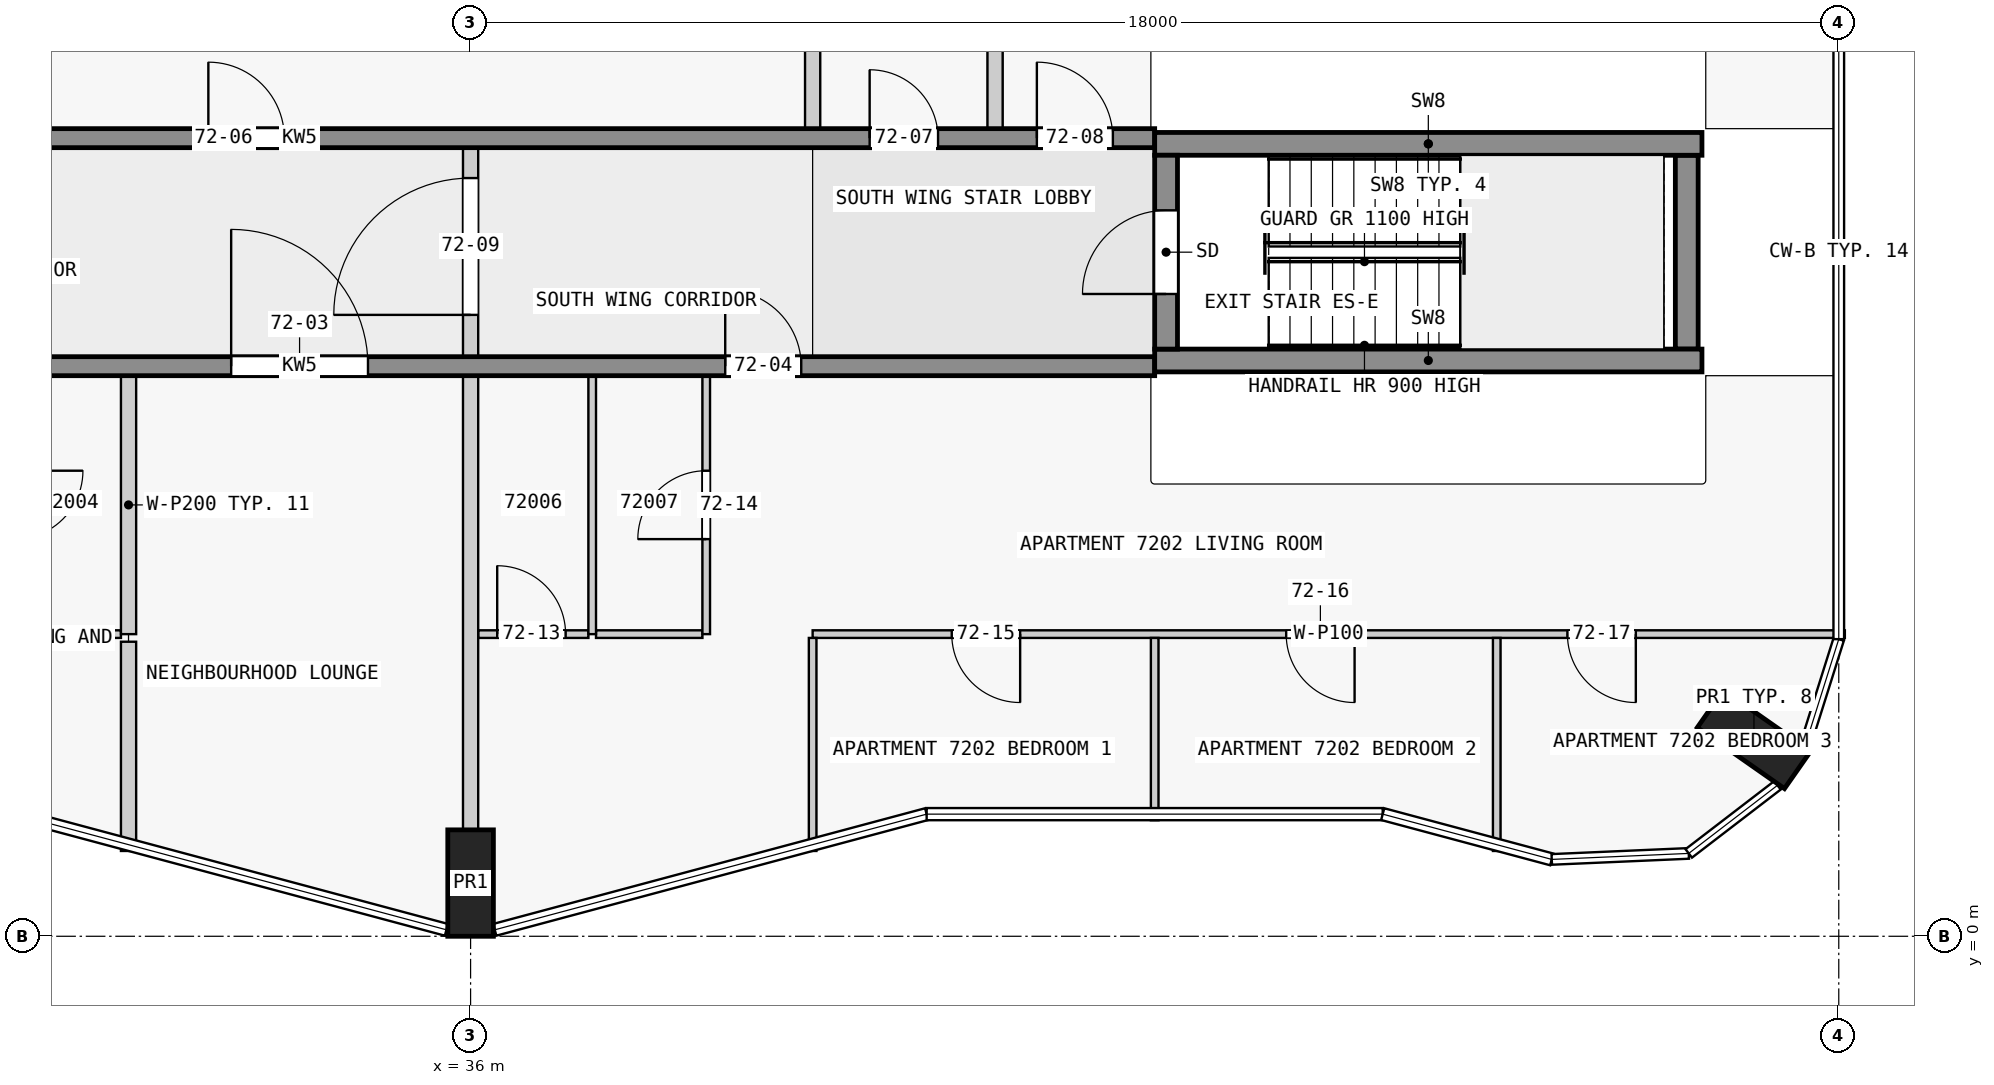
"""IFC4 building model, lengths in metres.
Left out: names, types, materials, properties, quantities, classifications, styles, units other than length and angle.
Written with IfcOpenShell. Run it as: python <this file> out.ifc"""

import sys

from ifc_helpers import new_model, si_unit, direction, frame, frame_2d, origin, origin_2d, place, context, subcontext, project, spatial, rectangle, extrude, element, fill, save


model = new_model("IFC4")
c1 = context("Model", 3, precision=1e-05, world=origin(), true_north=direction((0.0, 1.0)))
c2 = subcontext(c1, "Body", "Model", "MODEL_VIEW")
j1 = project(units=[si_unit("LENGTHUNIT", "METRE"), si_unit("PLANEANGLEUNIT", "RADIAN")], contexts=[c1])
p1 = place(None, origin())
s1 = spatial("IfcSite", under=j1, at=p1, CompositionType="ELEMENT")
p2 = place(p1, origin())
s2 = spatial("IfcBuilding", under=s1, at=p2, CompositionType="ELEMENT")
p3 = place(p2, frame((0.0, 0.0, 273.9)))
s3 = spatial("IfcBuildingStorey", under=s2, at=p3, CompositionType="ELEMENT", Elevation=273.9)
for number, where, z_axis, x_axis in (
    (1, (36.0, 0.7, 0.0), (0.0, 0.0, 1.0), (1.0, 0.0, 0.0)),
    (2, (52.884, 2.59, 0.0), (0.0, 0.0, 1.0), (0.574, 0.819, 0.0)),
):
    element("IfcColumn", number, at=place(p3, frame(where, z_axis=z_axis, x_axis=x_axis)), inside=s3, PredefinedType="COLUMN", context=c2, shape_type="SweptSolid", body=[
        extrude(rectangle(XDim=0.6, YDim=1.4, at=origin_2d()), origin(), (0.0, 0.0, 1.0), 3.5),
    ])
p4 = place(p3, frame((45.15, 7.725, 0.0), z_axis=(0.0, 0.0, 1.0), x_axis=(0.0, 1.0, 0.0)))
e3 = element("IfcWall", 3, at=p4, inside=s3, PredefinedType="SHEAR", context=c2, shape_type="SweptSolid", body=[
    extrude(rectangle(XDim=2.55, YDim=0.3, at=frame_2d((1.275, 0.0))), origin(), (0.0, 0.0, 1.0), 3.5),
])
p5 = place(p4, frame((0.725, 0.0, 0.0)))
e4 = element("IfcOpeningElement", 4, at=p5, cuts=e3, PredefinedType="OPENING", context=c2, shape_type="SweptSolid", body=[
    extrude(rectangle(XDim=1.1, YDim=2.1, at=frame_2d((0.55, 1.05))), frame((0.0, 0.16, 0.0), z_axis=(0.0, -1.0, 0.0), x_axis=(1.0, 0.0, 0.0)), (0.0, 0.0, 1.0), 0.32),
])
p6 = place(p3, frame((52.0, 7.725, 0.0), z_axis=(0.0, 0.0, 1.0), x_axis=(0.0, 1.0, 0.0)))
e5 = element("IfcWall", 5, at=p6, inside=s3, PredefinedType="SHEAR", context=c2, shape_type="SweptSolid", body=[
    extrude(rectangle(XDim=2.55, YDim=0.3, at=frame_2d((1.275, 0.0))), origin(), (0.0, 0.0, 1.0), 3.5),
])
for number, where, z_axis, x_axis in (
    (6, (45.0, 7.575, 0.0), (0.0, 0.0, 1.0), (1.0, 0.0, 0.0)),
    (7, (45.0, 10.425, 0.0), (0.0, 0.0, 1.0), (1.0, 0.0, 0.0)),
):
    element("IfcWall", number, at=place(p3, frame(where, z_axis=z_axis, x_axis=x_axis)), inside=s3, PredefinedType="SHEAR", context=c2, shape_type="SweptSolid", body=[
        extrude(rectangle(XDim=7.2, YDim=0.3, at=frame_2d((3.6, 0.0))), origin(), (0.0, 0.0, 1.0), 3.5),
    ])
p7 = place(p3, frame((22.5, 7.5, 0.0), z_axis=(0.0, 0.0, 1.0), x_axis=(1.0, 0.0, 0.0)))
e8 = element("IfcWall", 8, at=p7, inside=s3, PredefinedType="SHEAR", context=c2, shape_type="SweptSolid", body=[
    extrude(rectangle(XDim=22.5, YDim=0.25, at=frame_2d((11.25, 0.0))), origin(), (0.0, 0.0, 1.0), 3.25),
])
p8 = place(p7, frame((1.85, 0.0, 0.0)))
e9 = element("IfcOpeningElement", 9, at=p8, cuts=e8, PredefinedType="OPENING", context=c2, shape_type="SweptSolid", body=[
    extrude(rectangle(XDim=0.9, YDim=2.1, at=frame_2d((0.45, 1.05))), frame((0.0, 0.135, 0.0), z_axis=(0.0, -1.0, 0.0), x_axis=(1.0, 0.0, 0.0)), (0.0, 0.0, 1.0), 0.27),
])
p9 = place(p7, frame((6.25, 0.0, 0.0)))
e10 = element("IfcOpeningElement", 10, at=p9, cuts=e8, PredefinedType="OPENING", context=c2, shape_type="SweptSolid", body=[
    extrude(rectangle(XDim=1.0, YDim=2.1, at=frame_2d((0.5, 1.05))), frame((0.0, 0.135, 0.0), z_axis=(0.0, -1.0, 0.0), x_axis=(1.0, 0.0, 0.0)), (0.0, 0.0, 1.0), 0.27),
])
p10 = place(p7, frame((10.35, 0.0, 0.0)))
e11 = element("IfcOpeningElement", 11, at=p10, cuts=e8, PredefinedType="OPENING", context=c2, shape_type="SweptSolid", body=[
    extrude(rectangle(XDim=1.8, YDim=2.1, at=frame_2d((0.9, 1.05))), frame((0.0, 0.135, 0.0), z_axis=(0.0, -1.0, 0.0), x_axis=(1.0, 0.0, 0.0)), (0.0, 0.0, 1.0), 0.27),
])
p11 = place(p7, frame((16.85, 0.0, 0.0)))
e12 = element("IfcOpeningElement", 12, at=p11, cuts=e8, PredefinedType="OPENING", context=c2, shape_type="SweptSolid", body=[
    extrude(rectangle(XDim=1.0, YDim=2.1, at=frame_2d((0.5, 1.05))), frame((0.0, 0.135, 0.0), z_axis=(0.0, -1.0, 0.0), x_axis=(1.0, 0.0, 0.0)), (0.0, 0.0, 1.0), 0.27),
])
p12 = place(p3, frame((22.5, 10.5, 0.0), z_axis=(0.0, 0.0, 1.0), x_axis=(1.0, 0.0, 0.0)))
e13 = element("IfcWall", 13, at=p12, inside=s3, PredefinedType="SHEAR", context=c2, shape_type="SweptSolid", body=[
    extrude(rectangle(XDim=22.5, YDim=0.25, at=frame_2d((11.25, 0.0))), origin(), (0.0, 0.0, 1.0), 3.25),
])
p13 = place(p12, frame((1.85, 0.0, 0.0)))
e14 = element("IfcOpeningElement", 14, at=p13, cuts=e13, PredefinedType="OPENING", context=c2, shape_type="SweptSolid", body=[
    extrude(rectangle(XDim=0.9, YDim=2.1, at=frame_2d((0.45, 1.05))), frame((0.0, 0.135, 0.0), z_axis=(0.0, -1.0, 0.0), x_axis=(1.0, 0.0, 0.0)), (0.0, 0.0, 1.0), 0.27),
])
p14 = place(p12, frame((10.05, 0.0, 0.0)))
e15 = element("IfcOpeningElement", 15, at=p14, cuts=e13, PredefinedType="OPENING", context=c2, shape_type="SweptSolid", body=[
    extrude(rectangle(XDim=1.0, YDim=2.1, at=frame_2d((0.5, 1.05))), frame((0.0, 0.135, 0.0), z_axis=(0.0, -1.0, 0.0), x_axis=(1.0, 0.0, 0.0)), (0.0, 0.0, 1.0), 0.27),
])
p15 = place(p12, frame((18.75, 0.0, 0.0)))
e16 = element("IfcOpeningElement", 16, at=p15, cuts=e13, PredefinedType="OPENING", context=c2, shape_type="SweptSolid", body=[
    extrude(rectangle(XDim=0.9, YDim=2.1, at=frame_2d((0.45, 1.05))), frame((0.0, 0.135, 0.0), z_axis=(0.0, -1.0, 0.0), x_axis=(1.0, 0.0, 0.0)), (0.0, 0.0, 1.0), 0.27),
])
p16 = place(p12, frame((20.95, 0.0, 0.0)))
e17 = element("IfcOpeningElement", 17, at=p16, cuts=e13, PredefinedType="OPENING", context=c2, shape_type="SweptSolid", body=[
    extrude(rectangle(XDim=1.0, YDim=2.1, at=frame_2d((0.5, 1.05))), frame((0.0, 0.135, 0.0), z_axis=(0.0, -1.0, 0.0), x_axis=(1.0, 0.0, 0.0)), (0.0, 0.0, 1.0), 0.27),
])
p17 = place(p3, frame((54.08, 3.975, 0.0), z_axis=(0.0, 0.0, 1.0), x_axis=(-1.0, 0.0, 0.0)))
e18 = element("IfcWall", 18, at=p17, inside=s3, PredefinedType="PARTITIONING", context=c2, shape_type="SweptSolid", body=[
    extrude(rectangle(XDim=13.58, YDim=0.1, at=frame_2d((6.79, 0.0))), origin(), (0.0, 0.0, 1.0), 3.25),
])
p18 = place(p17, frame((10.85, 0.0, 0.0)))
e19 = element("IfcOpeningElement", 19, at=p18, cuts=e18, PredefinedType="OPENING", context=c2, shape_type="SweptSolid", body=[
    extrude(rectangle(XDim=0.9, YDim=2.1, at=frame_2d((0.45, 1.05))), frame((0.0, 0.06, 0.0), z_axis=(0.0, -1.0, 0.0), x_axis=(1.0, 0.0, 0.0)), (0.0, 0.0, 1.0), 0.12),
])
p19 = place(p17, frame((6.45, 0.0, 0.0)))
e20 = element("IfcOpeningElement", 20, at=p19, cuts=e18, PredefinedType="OPENING", context=c2, shape_type="SweptSolid", body=[
    extrude(rectangle(XDim=0.9, YDim=2.1, at=frame_2d((0.45, 1.05))), frame((0.0, 0.06, 0.0), z_axis=(0.0, -1.0, 0.0), x_axis=(1.0, 0.0, 0.0)), (0.0, 0.0, 1.0), 0.12),
])
p20 = place(p17, frame((2.75, 0.0, 0.0)))
e21 = element("IfcOpeningElement", 21, at=p20, cuts=e18, PredefinedType="OPENING", context=c2, shape_type="SweptSolid", body=[
    extrude(rectangle(XDim=0.9, YDim=2.1, at=frame_2d((0.45, 1.05))), frame((0.0, 0.06, 0.0), z_axis=(0.0, -1.0, 0.0), x_axis=(1.0, 0.0, 0.0)), (0.0, 0.0, 1.0), 0.12),
])
p21 = place(p3, frame((30.05, 3.975, 0.0), z_axis=(0.0, 0.0, 1.0), x_axis=(1.0, 0.0, 0.0)))
e22 = element("IfcWall", 22, at=p21, inside=s3, PredefinedType="PARTITIONING", context=c2, shape_type="SweptSolid", body=[
    extrude(rectangle(XDim=1.35, YDim=0.1, at=frame_2d((0.675, 0.0))), origin(), (0.0, 0.0, 1.0), 3.25),
])
p22 = place(p3, frame((36.1, 3.975, 0.0), z_axis=(0.0, 0.0, 1.0), x_axis=(1.0, 0.0, 0.0)))
e23 = element("IfcWall", 23, at=p22, inside=s3, PredefinedType="PARTITIONING", context=c2, shape_type="SweptSolid", body=[
    extrude(rectangle(XDim=1.45, YDim=0.1, at=frame_2d((0.725, 0.0))), origin(), (0.0, 0.0, 1.0), 3.25),
])
p23 = place(p22, frame((0.25, 0.0, 0.0)))
e24 = element("IfcOpeningElement", 24, at=p23, cuts=e23, PredefinedType="OPENING", context=c2, shape_type="SweptSolid", body=[
    extrude(rectangle(XDim=0.9, YDim=2.1, at=frame_2d((0.45, 1.05))), frame((0.0, 0.06, 0.0), z_axis=(0.0, -1.0, 0.0), x_axis=(1.0, 0.0, 0.0)), (0.0, 0.0, 1.0), 0.12),
])
p24 = place(p3, frame((37.65, 3.975, 0.0), z_axis=(0.0, 0.0, 1.0), x_axis=(1.0, 0.0, 0.0)))
e25 = element("IfcWall", 25, at=p24, inside=s3, PredefinedType="PARTITIONING", context=c2, shape_type="SweptSolid", body=[
    extrude(rectangle(XDim=1.4, YDim=0.1, at=frame_2d((0.7, 0.0))), origin(), (0.0, 0.0, 1.0), 3.25),
])
p25 = place(p3, frame((31.5, 3.875, 0.0), z_axis=(0.0, 0.0, 1.0), x_axis=(0.0, -1.0, 0.0)))
e26 = element("IfcWall", 26, at=p25, inside=s3, PredefinedType="PARTITIONING", context=c2, shape_type="SweptSolid", body=[
    extrude(rectangle(XDim=2.753, YDim=0.2, at=frame_2d((1.376, 0.0))), origin(), (0.0, 0.0, 1.0), 3.25),
])
p26 = place(p3, frame((31.5, 3.975, 0.0), z_axis=(0.0, 0.0, 1.0), x_axis=(0.0, 1.0, 0.0)))
e27 = element("IfcWall", 27, at=p26, inside=s3, PredefinedType="PARTITIONING", context=c2, shape_type="SweptSolid", body=[
    extrude(rectangle(XDim=3.4, YDim=0.2, at=frame_2d((1.7, 0.0))), origin(), (0.0, 0.0, 1.0), 3.25),
])
p27 = place(p3, frame((36.0, 1.4, 0.0), z_axis=(0.0, 0.0, 1.0), x_axis=(0.0, 1.0, 0.0)))
e28 = element("IfcWall", 28, at=p27, inside=s3, PredefinedType="PARTITIONING", context=c2, shape_type="SweptSolid", body=[
    extrude(rectangle(XDim=5.975, YDim=0.2, at=frame_2d((2.988, 0.0))), origin(), (0.0, 0.0, 1.0), 3.25),
])
p28 = place(p3, frame((37.6, 3.975, 0.0), z_axis=(0.0, 0.0, 1.0), x_axis=(0.0, 1.0, 0.0)))
e29 = element("IfcWall", 29, at=p28, inside=s3, PredefinedType="PARTITIONING", context=c2, shape_type="SweptSolid", body=[
    extrude(rectangle(XDim=3.4, YDim=0.1, at=frame_2d((1.7, 0.0))), origin(), (0.0, 0.0, 1.0), 3.25),
])
p29 = place(p3, frame((39.1, 3.975, 0.0), z_axis=(0.0, 0.0, 1.0), x_axis=(0.0, 1.0, 0.0)))
e30 = element("IfcWall", 30, at=p29, inside=s3, PredefinedType="PARTITIONING", context=c2, shape_type="SweptSolid", body=[
    extrude(rectangle(XDim=3.4, YDim=0.1, at=frame_2d((1.7, 0.0))), origin(), (0.0, 0.0, 1.0), 3.25),
])
p30 = place(p29, frame((1.25, 0.0, 0.0)))
e31 = element("IfcOpeningElement", 31, at=p30, cuts=e30, PredefinedType="OPENING", context=c2, shape_type="SweptSolid", body=[
    extrude(rectangle(XDim=0.9, YDim=2.1, at=frame_2d((0.45, 1.05))), frame((0.0, 0.06, 0.0), z_axis=(0.0, -1.0, 0.0), x_axis=(1.0, 0.0, 0.0)), (0.0, 0.0, 1.0), 0.12),
])
p31 = place(p3, frame((40.5, 3.925, 0.0), z_axis=(0.0, 0.0, 1.0), x_axis=(0.0, -1.0, 0.0)))
e32 = element("IfcWall", 32, at=p31, inside=s3, PredefinedType="PARTITIONING", context=c2, shape_type="SweptSolid", body=[
    extrude(rectangle(XDim=2.803, YDim=0.1, at=frame_2d((1.401, 0.0))), origin(), (0.0, 0.0, 1.0), 3.25),
])
for number, where, z_axis, x_axis in (
    (33, (40.5, 14.025, 0.0), (0.0, 0.0, 1.0), (0.0, -1.0, 0.0)),
    (34, (42.9, 10.625, 0.0), (0.0, 0.0, 1.0), (0.0, 1.0, 0.0)),
):
    element("IfcWall", number, at=place(p3, frame(where, z_axis=z_axis, x_axis=x_axis)), inside=s3, PredefinedType="PARTITIONING", context=c2, shape_type="SweptSolid", body=[
        extrude(rectangle(XDim=3.4, YDim=0.2, at=frame_2d((1.7, 0.0))), origin(), (0.0, 0.0, 1.0), 3.25),
    ])
p32 = place(p3, frame((45.0, 1.527, 0.0), z_axis=(0.0, 0.0, 1.0), x_axis=(0.0, 1.0, 0.0)))
e35 = element("IfcWall", 35, at=p32, inside=s3, PredefinedType="PARTITIONING", context=c2, shape_type="SweptSolid", body=[
    extrude(rectangle(XDim=2.398, YDim=0.1, at=frame_2d((1.199, 0.0))), origin(), (0.0, 0.0, 1.0), 3.25),
])
p33 = place(p3, frame((49.5, 1.122, 0.0), z_axis=(0.0, 0.0, 1.0), x_axis=(0.0, 1.0, 0.0)))
e36 = element("IfcWall", 36, at=p33, inside=s3, PredefinedType="PARTITIONING", context=c2, shape_type="SweptSolid", body=[
    extrude(rectangle(XDim=2.803, YDim=0.1, at=frame_2d((1.401, 0.0))), origin(), (0.0, 0.0, 1.0), 3.25),
])
p34 = place(p3, frame((36.0, 7.475, 0.0), z_axis=(0.0, 0.0, 1.0), x_axis=(0.0, 1.0, 0.0)))
e37 = element("IfcWall", 37, at=p34, inside=s3, PredefinedType="PARTITIONING", context=c2, shape_type="SweptSolid", body=[
    extrude(rectangle(XDim=3.15, YDim=0.2, at=frame_2d((1.575, 0.0))), origin(), (0.0, 0.0, 1.0), 3.25),
])
p35 = place(p34, frame((0.7, 0.0, 0.0)))
e38 = element("IfcOpeningElement", 38, at=p35, cuts=e37, PredefinedType="OPENING", context=c2, shape_type="SweptSolid", body=[
    extrude(rectangle(XDim=1.8, YDim=2.1, at=frame_2d((0.9, 1.05))), frame((0.0, 0.11, 0.0), z_axis=(0.0, -1.0, 0.0), x_axis=(1.0, 0.0, 0.0)), (0.0, 0.0, 1.0), 0.22),
])
p36 = place(p5, origin())
e39 = element("IfcDoor", 39, at=p36, inside=s3, OperationType="SINGLE_SWING_LEFT", PredefinedType="DOOR", context=c2, shape_type="SweptSolid", body=[
    extrude(rectangle(XDim=1.1, YDim=2.1, at=frame_2d((0.55, 1.05))), frame((0.0, 0.025, 0.0), z_axis=(0.0, -1.0, 0.0), x_axis=(1.0, 0.0, 0.0)), (0.0, 0.0, 1.0), 0.05),
])
fill(e4, e39)
p37 = place(p10, origin())
e40 = element("IfcDoor", 40, at=p37, inside=s3, OperationType="SINGLE_SWING_LEFT", PredefinedType="DOOR", context=c2, shape_type="SweptSolid", body=[
    extrude(rectangle(XDim=1.8, YDim=2.1, at=frame_2d((0.9, 1.05))), frame((0.0, 0.025, 0.0), z_axis=(0.0, -1.0, 0.0), x_axis=(1.0, 0.0, 0.0)), (0.0, 0.0, 1.0), 0.05),
])
fill(e11, e40)
p38 = place(p11, origin())
e41 = element("IfcDoor", 41, at=p38, inside=s3, OperationType="SINGLE_SWING_RIGHT", PredefinedType="DOOR", context=c2, shape_type="SweptSolid", body=[
    extrude(rectangle(XDim=1.0, YDim=2.1, at=frame_2d((0.5, 1.05))), frame((0.0, 0.025, 0.0), z_axis=(0.0, -1.0, 0.0), x_axis=(1.0, 0.0, 0.0)), (0.0, 0.0, 1.0), 0.05),
])
fill(e12, e41)
p39 = place(p14, origin())
e42 = element("IfcDoor", 42, at=p39, inside=s3, OperationType="SINGLE_SWING_LEFT", PredefinedType="DOOR", context=c2, shape_type="SweptSolid", body=[
    extrude(rectangle(XDim=1.0, YDim=2.1, at=frame_2d((0.5, 1.05))), frame((0.0, 0.025, 0.0), z_axis=(0.0, -1.0, 0.0), x_axis=(1.0, 0.0, 0.0)), (0.0, 0.0, 1.0), 0.05),
])
fill(e15, e42)
p40 = place(p15, origin())
e43 = element("IfcDoor", 43, at=p40, inside=s3, OperationType="SINGLE_SWING_RIGHT", PredefinedType="DOOR", context=c2, shape_type="SweptSolid", body=[
    extrude(rectangle(XDim=0.9, YDim=2.1, at=frame_2d((0.45, 1.05))), frame((0.0, 0.025, 0.0), z_axis=(0.0, -1.0, 0.0), x_axis=(1.0, 0.0, 0.0)), (0.0, 0.0, 1.0), 0.05),
])
fill(e16, e43)
p41 = place(p16, origin())
e44 = element("IfcDoor", 44, at=p41, inside=s3, OperationType="SINGLE_SWING_RIGHT", PredefinedType="DOOR", context=c2, shape_type="SweptSolid", body=[
    extrude(rectangle(XDim=1.0, YDim=2.1, at=frame_2d((0.5, 1.05))), frame((0.0, 0.025, 0.0), z_axis=(0.0, -1.0, 0.0), x_axis=(1.0, 0.0, 0.0)), (0.0, 0.0, 1.0), 0.05),
])
fill(e17, e44)
p42 = place(p35, origin())
e45 = element("IfcDoor", 45, at=p42, inside=s3, OperationType="SINGLE_SWING_RIGHT", PredefinedType="DOOR", context=c2, shape_type="SweptSolid", body=[
    extrude(rectangle(XDim=1.8, YDim=2.1, at=frame_2d((0.9, 1.05))), frame((0.0, 0.025, 0.0), z_axis=(0.0, -1.0, 0.0), x_axis=(1.0, 0.0, 0.0)), (0.0, 0.0, 1.0), 0.05),
])
fill(e38, e45)
p43 = place(p23, origin())
e46 = element("IfcDoor", 46, at=p43, inside=s3, OperationType="SINGLE_SWING_LEFT", PredefinedType="DOOR", context=c2, shape_type="SweptSolid", body=[
    extrude(rectangle(XDim=0.9, YDim=2.1, at=frame_2d((0.45, 1.05))), frame((0.0, 0.025, 0.0), z_axis=(0.0, -1.0, 0.0), x_axis=(1.0, 0.0, 0.0)), (0.0, 0.0, 1.0), 0.05),
])
fill(e24, e46)
p44 = place(p30, origin())
e47 = element("IfcDoor", 47, at=p44, inside=s3, OperationType="SINGLE_SWING_LEFT", PredefinedType="DOOR", context=c2, shape_type="SweptSolid", body=[
    extrude(rectangle(XDim=0.9, YDim=2.1, at=frame_2d((0.45, 1.05))), frame((0.0, 0.025, 0.0), z_axis=(0.0, -1.0, 0.0), x_axis=(1.0, 0.0, 0.0)), (0.0, 0.0, 1.0), 0.05),
])
fill(e31, e47)
p45 = place(p18, origin())
e48 = element("IfcDoor", 48, at=p45, inside=s3, OperationType="SINGLE_SWING_RIGHT", PredefinedType="DOOR", context=c2, shape_type="SweptSolid", body=[
    extrude(rectangle(XDim=0.9, YDim=2.1, at=frame_2d((0.45, 1.05))), frame((0.0, 0.025, 0.0), z_axis=(0.0, -1.0, 0.0), x_axis=(1.0, 0.0, 0.0)), (0.0, 0.0, 1.0), 0.05),
])
fill(e19, e48)
p46 = place(p19, origin())
e49 = element("IfcDoor", 49, at=p46, inside=s3, OperationType="SINGLE_SWING_RIGHT", PredefinedType="DOOR", context=c2, shape_type="SweptSolid", body=[
    extrude(rectangle(XDim=0.9, YDim=2.1, at=frame_2d((0.45, 1.05))), frame((0.0, 0.025, 0.0), z_axis=(0.0, -1.0, 0.0), x_axis=(1.0, 0.0, 0.0)), (0.0, 0.0, 1.0), 0.05),
])
fill(e20, e49)
p47 = place(p20, origin())
e50 = element("IfcDoor", 50, at=p47, inside=s3, OperationType="SINGLE_SWING_LEFT", PredefinedType="DOOR", context=c2, shape_type="SweptSolid", body=[
    extrude(rectangle(XDim=0.9, YDim=2.1, at=frame_2d((0.45, 1.05))), frame((0.0, 0.025, 0.0), z_axis=(0.0, -1.0, 0.0), x_axis=(1.0, 0.0, 0.0)), (0.0, 0.0, 1.0), 0.05),
])
fill(e21, e50)
save(model, sys.argv[1])
